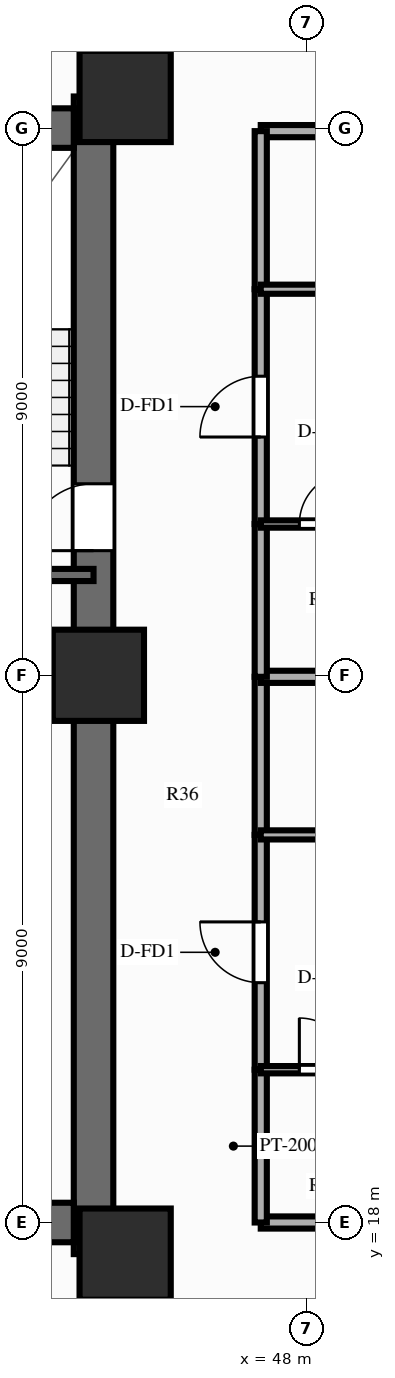
"""IFC4 building model, lengths in metres.
Left out: names, types, materials, properties, quantities, classifications, styles, units other than length and angle.
Written with IfcOpenShell. Run it as: python <this file> out.ifc"""

import sys

from ifc_helpers import new_model, si_unit, direction, frame, frame_2d, origin, origin_2d, place, context, subcontext, project, spatial, rectangle, extrude, source, transform, mapped, element, fill, save


model = new_model("IFC4")
c1 = context("Model", 3, precision=1e-05, world=origin(), true_north=direction((0.0, 1.0)))
c2 = subcontext(c1, "Body", "Model", "MODEL_VIEW")
j1 = project(units=[si_unit("LENGTHUNIT", "METRE"), si_unit("PLANEANGLEUNIT", "RADIAN")], contexts=[c1])
p1 = place(None, origin())
s1 = spatial("IfcSite", under=j1, at=p1, CompositionType="ELEMENT")
p2 = place(p1, origin())
s2 = spatial("IfcBuilding", under=s1, at=p2, CompositionType="ELEMENT")
p3 = place(p2, frame((0.0, 0.0, 25.4)))
s3 = spatial("IfcBuildingStorey", under=s2, at=p3, CompositionType="ELEMENT", Elevation=25.4)
p4 = place(p3, frame((44.5, 17.48, 0.0), z_axis=(0.0, 0.0, 1.0), x_axis=(0.0, 1.0, 0.0)))
e1 = element("IfcWall", 1, at=p4, inside=s3, PredefinedType="SHEAR", context=c2, shape_type="SweptSolid", body=[
    extrude(rectangle(XDim=19.04, YDim=0.65, at=frame_2d((9.52, 0.0))), origin(), (0.0, 0.0, 1.0), 3.0),
])
p5 = place(p4, frame((12.67, 0.0, 0.0), z_axis=(0.0, 0.0, 1.0), x_axis=(-1.0, 0.0, 0.0)))
e2 = element("IfcOpeningElement", 2, at=p5, cuts=e1, PredefinedType="OPENING", context=c2, shape_type="SweptSolid", body=[
    extrude(rectangle(XDim=1.1, YDim=2.15, at=frame_2d((0.55, 1.075))), frame((0.0, 0.337, 0.0), z_axis=(0.0, -1.0, 0.0), x_axis=(1.0, 0.0, 0.0)), (0.0, 0.0, 1.0), 0.674),
])
p6 = place(p3, frame((31.825, 18.0, 0.0), z_axis=(0.0, 0.0, 1.0), x_axis=(1.0, 0.0, 0.0)))
e3 = element("IfcWall", 3, at=p6, inside=s3, PredefinedType="SHEAR", context=c2, shape_type="SweptSolid", body=[
    extrude(rectangle(XDim=12.35, YDim=0.65, at=frame_2d((6.175, 0.0))), origin(), (0.0, 0.0, 1.0), 3.0),
])
p7 = place(p3, frame((31.825, 36.0, 0.0), z_axis=(0.0, 0.0, 1.0), x_axis=(1.0, 0.0, 0.0)))
e4 = element("IfcWall", 4, at=p7, inside=s3, PredefinedType="SHEAR", context=c2, shape_type="SweptSolid", body=[
    extrude(rectangle(XDim=12.35, YDim=0.65, at=frame_2d((6.175, 0.0))), origin(), (0.0, 0.0, 1.0), 3.0),
])
p8 = place(p7, frame((5.125, 0.0, 0.0), z_axis=(0.0, 0.0, 1.0), x_axis=(-1.0, 0.0, 0.0)))
e5 = element("IfcOpeningElement", 5, at=p8, cuts=e4, PredefinedType="OPENING", context=c2, shape_type="SweptSolid", body=[
    extrude(rectangle(XDim=1.4, YDim=2.15, at=frame_2d((0.7, 1.075))), frame((0.0, 0.337, 0.0), z_axis=(0.0, -1.0, 0.0), x_axis=(1.0, 0.0, 0.0)), (0.0, 0.0, 1.0), 0.674),
])
m1 = source(origin(), c2, "Body", "SweptSolid", [
    extrude(rectangle(XDim=1.5, YDim=1.5, at=origin_2d()), origin(), (0.0, 0.0, 1.0), 3.0),
])
for number, where, z_axis, x_axis in (
    (6, (45.02, 17.48, 0.0), (0.0, 0.0, 1.0), (1.0, 0.0, 0.0)),
    (7, (45.02, 36.52, 0.0), (0.0, 0.0, 1.0), (1.0, 0.0, 0.0)),
    (8, (44.58, 27.0, 0.0), (0.0, 0.0, 1.0), (1.0, 0.0, 0.0)),
):
    element("IfcColumn", number, at=place(p3, frame(where, z_axis=z_axis, x_axis=x_axis)), inside=s3, PredefinedType="COLUMN", context=c2, shape_type="MappedRepresentation", body=[
        mapped(m1, transform((0.0, 0.0, 0.0), scale=1.0)),
    ])
p9 = place(p3, frame((40.57, 28.65, 0.0), z_axis=(0.0, 0.0, 1.0), x_axis=(1.0, 0.0, 0.0)))
e9 = element("IfcWall", 9, at=p9, inside=s3, PredefinedType="SOLIDWALL", context=c2, shape_type="SweptSolid", body=[
    extrude(rectangle(XDim=3.93, YDim=0.2, at=frame_2d((1.965, 0.0))), origin(), (0.0, 0.0, 1.0), 2.79),
])
for number, where, z_axis, x_axis in (
    (10, (47.25, 18.0, 0.0), (0.0, 0.0, 1.0), (1.0, 0.0, 0.0)),
    (11, (47.25, 35.95, 0.0), (0.0, 0.0, 1.0), (1.0, 0.0, 0.0)),
):
    element("IfcWall", number, at=place(p3, frame(where, z_axis=z_axis, x_axis=x_axis)), inside=s3, PredefinedType="PARTITIONING", context=c2, shape_type="SweptSolid", body=[
        extrude(rectangle(XDim=16.6, YDim=0.2, at=frame_2d((8.3, 0.0))), origin(), (0.0, 0.0, 1.0), 2.24),
    ])
p10 = place(p3, frame((47.25, 18.0, 0.0), z_axis=(0.0, 0.0, 1.0), x_axis=(0.0, 1.0, 0.0)))
e12 = element("IfcWall", 12, at=p10, inside=s3, PredefinedType="PARTITIONING", context=c2, shape_type="SweptSolid", body=[
    extrude(rectangle(XDim=2.513, YDim=0.2, at=frame_2d((1.256, 0.0))), origin(), (0.0, 0.0, 1.0), 2.79),
])
p11 = place(p3, frame((47.25, 20.513, 0.0), z_axis=(0.0, 0.0, 1.0), x_axis=(0.0, 1.0, 0.0)))
e13 = element("IfcWall", 13, at=p11, inside=s3, PredefinedType="PARTITIONING", context=c2, shape_type="SweptSolid", body=[
    extrude(rectangle(XDim=3.862, YDim=0.2, at=frame_2d((1.931, 0.0))), origin(), (0.0, 0.0, 1.0), 2.79),
])
p12 = place(p11, frame((1.431, 0.0, 0.0)))
e14 = element("IfcOpeningElement", 14, at=p12, cuts=e13, PredefinedType="OPENING", context=c2, shape_type="SweptSolid", body=[
    extrude(rectangle(XDim=1.0, YDim=2.15, at=frame_2d((0.5, 1.075))), frame((0.0, 0.112, 0.0), z_axis=(0.0, -1.0, 0.0), x_axis=(1.0, 0.0, 0.0)), (0.0, 0.0, 1.0), 0.224),
])
p13 = place(p3, frame((47.25, 24.375, 0.0), z_axis=(0.0, 0.0, 1.0), x_axis=(0.0, 1.0, 0.0)))
e15 = element("IfcWall", 15, at=p13, inside=s3, PredefinedType="PARTITIONING", context=c2, shape_type="SweptSolid", body=[
    extrude(rectangle(XDim=2.6, YDim=0.2, at=frame_2d((1.3, 0.0))), origin(), (0.0, 0.0, 1.0), 2.79),
])
p14 = place(p3, frame((47.25, 20.513, 0.0), z_axis=(0.0, 0.0, 1.0), x_axis=(1.0, 0.0, 0.0)))
e16 = element("IfcWall", 16, at=p14, inside=s3, PredefinedType="PARTITIONING", context=c2, shape_type="SweptSolid", body=[
    extrude(rectangle(XDim=2.12, YDim=0.12, at=frame_2d((1.06, 0.0))), origin(), (0.0, 0.0, 1.0), 2.79),
])
p15 = place(p14, frame((0.635, 0.0, 0.0)))
e17 = element("IfcOpeningElement", 17, at=p15, cuts=e16, PredefinedType="OPENING", context=c2, shape_type="SweptSolid", body=[
    extrude(rectangle(XDim=0.85, YDim=2.05, at=frame_2d((0.425, 1.025))), frame((0.0, 0.072, 0.0), z_axis=(0.0, -1.0, 0.0), x_axis=(1.0, 0.0, 0.0)), (0.0, 0.0, 1.0), 0.144),
])
p16 = place(p3, frame((47.25, 24.375, 0.0), z_axis=(0.0, 0.0, 1.0), x_axis=(1.0, 0.0, 0.0)))
e18 = element("IfcWall", 18, at=p16, inside=s3, PredefinedType="PARTITIONING", context=c2, shape_type="SweptSolid", body=[
    extrude(rectangle(XDim=3.07, YDim=0.15, at=frame_2d((1.535, 0.0))), origin(), (0.0, 0.0, 1.0), 2.79),
])
p17 = place(p16, frame((1.085, 0.0, 0.0)))
e19 = element("IfcOpeningElement", 19, at=p17, cuts=e18, PredefinedType="OPENING", context=c2, shape_type="SweptSolid", body=[
    extrude(rectangle(XDim=0.9, YDim=2.1, at=frame_2d((0.45, 1.05))), frame((0.0, 0.087, 0.0), z_axis=(0.0, -1.0, 0.0), x_axis=(1.0, 0.0, 0.0)), (0.0, 0.0, 1.0), 0.174),
])
p18 = place(p3, frame((47.25, 26.975, 0.0), z_axis=(0.0, 0.0, 1.0), x_axis=(1.0, 0.0, 0.0)))
e20 = element("IfcWall", 20, at=p18, inside=s3, PredefinedType="PARTITIONING", context=c2, shape_type="SweptSolid", body=[
    extrude(rectangle(XDim=16.6, YDim=0.2, at=frame_2d((8.3, 0.0))), origin(), (0.0, 0.0, 1.0), 2.79),
])
p19 = place(p3, frame((47.25, 26.975, 0.0), z_axis=(0.0, 0.0, 1.0), x_axis=(0.0, 1.0, 0.0)))
e21 = element("IfcWall", 21, at=p19, inside=s3, PredefinedType="PARTITIONING", context=c2, shape_type="SweptSolid", body=[
    extrude(rectangle(XDim=2.513, YDim=0.2, at=frame_2d((1.256, 0.0))), origin(), (0.0, 0.0, 1.0), 2.79),
])
p20 = place(p3, frame((47.25, 29.488, 0.0), z_axis=(0.0, 0.0, 1.0), x_axis=(0.0, 1.0, 0.0)))
e22 = element("IfcWall", 22, at=p20, inside=s3, PredefinedType="PARTITIONING", context=c2, shape_type="SweptSolid", body=[
    extrude(rectangle(XDim=3.862, YDim=0.2, at=frame_2d((1.931, 0.0))), origin(), (0.0, 0.0, 1.0), 2.79),
])
p21 = place(p20, frame((1.431, 0.0, 0.0)))
e23 = element("IfcOpeningElement", 23, at=p21, cuts=e22, PredefinedType="OPENING", context=c2, shape_type="SweptSolid", body=[
    extrude(rectangle(XDim=1.0, YDim=2.15, at=frame_2d((0.5, 1.075))), frame((0.0, 0.112, 0.0), z_axis=(0.0, -1.0, 0.0), x_axis=(1.0, 0.0, 0.0)), (0.0, 0.0, 1.0), 0.224),
])
p22 = place(p3, frame((47.25, 33.35, 0.0), z_axis=(0.0, 0.0, 1.0), x_axis=(0.0, 1.0, 0.0)))
e24 = element("IfcWall", 24, at=p22, inside=s3, PredefinedType="PARTITIONING", context=c2, shape_type="SweptSolid", body=[
    extrude(rectangle(XDim=2.6, YDim=0.2, at=frame_2d((1.3, 0.0))), origin(), (0.0, 0.0, 1.0), 2.79),
])
p23 = place(p3, frame((47.25, 29.488, 0.0), z_axis=(0.0, 0.0, 1.0), x_axis=(1.0, 0.0, 0.0)))
e25 = element("IfcWall", 25, at=p23, inside=s3, PredefinedType="PARTITIONING", context=c2, shape_type="SweptSolid", body=[
    extrude(rectangle(XDim=2.12, YDim=0.12, at=frame_2d((1.06, 0.0))), origin(), (0.0, 0.0, 1.0), 2.79),
])
p24 = place(p23, frame((0.635, 0.0, 0.0)))
e26 = element("IfcOpeningElement", 26, at=p24, cuts=e25, PredefinedType="OPENING", context=c2, shape_type="SweptSolid", body=[
    extrude(rectangle(XDim=0.85, YDim=2.05, at=frame_2d((0.425, 1.025))), frame((0.0, 0.072, 0.0), z_axis=(0.0, -1.0, 0.0), x_axis=(1.0, 0.0, 0.0)), (0.0, 0.0, 1.0), 0.144),
])
p25 = place(p3, frame((47.25, 33.35, 0.0), z_axis=(0.0, 0.0, 1.0), x_axis=(1.0, 0.0, 0.0)))
e27 = element("IfcWall", 27, at=p25, inside=s3, PredefinedType="PARTITIONING", context=c2, shape_type="SweptSolid", body=[
    extrude(rectangle(XDim=3.07, YDim=0.15, at=frame_2d((1.535, 0.0))), origin(), (0.0, 0.0, 1.0), 2.79),
])
p26 = place(p25, frame((1.085, 0.0, 0.0)))
e28 = element("IfcOpeningElement", 28, at=p26, cuts=e27, PredefinedType="OPENING", context=c2, shape_type="SweptSolid", body=[
    extrude(rectangle(XDim=0.9, YDim=2.1, at=frame_2d((0.45, 1.05))), frame((0.0, 0.087, 0.0), z_axis=(0.0, -1.0, 0.0), x_axis=(1.0, 0.0, 0.0)), (0.0, 0.0, 1.0), 0.174),
])
m2 = source(origin(), c2, "Body", "SweptSolid", [
    extrude(rectangle(XDim=1.1, YDim=2.15, at=frame_2d((0.55, 1.075))), frame((0.0, 0.025, 0.0), z_axis=(0.0, -1.0, 0.0), x_axis=(1.0, 0.0, 0.0)), (0.0, 0.0, 1.0), 0.05),
])
p27 = place(p5, origin())
e29 = element("IfcDoor", 29, at=p27, inside=s3, OperationType="SINGLE_SWING_RIGHT", PredefinedType="DOOR", context=c2, shape_type="MappedRepresentation", body=[
    mapped(m2, transform((0.0, 0.0, 0.0), scale=1.0)),
])
fill(e2, e29)
m3 = source(origin(), c2, "Body", "SweptSolid", [
    extrude(rectangle(XDim=1.0, YDim=2.15, at=frame_2d((0.5, 1.075))), frame((0.0, 0.025, 0.0), z_axis=(0.0, -1.0, 0.0), x_axis=(1.0, 0.0, 0.0)), (0.0, 0.0, 1.0), 0.05),
])
p28 = place(p12, origin())
e30 = element("IfcDoor", 30, at=p28, inside=s3, OperationType="SINGLE_SWING_RIGHT", PredefinedType="DOOR", context=c2, shape_type="MappedRepresentation", body=[
    mapped(m3, transform((0.0, 0.0, 0.0), scale=1.0)),
])
fill(e14, e30)
m4 = source(origin(), c2, "Body", "SweptSolid", [
    extrude(rectangle(XDim=0.85, YDim=2.05, at=frame_2d((0.425, 1.025))), frame((0.0, 0.025, 0.0), z_axis=(0.0, -1.0, 0.0), x_axis=(1.0, 0.0, 0.0)), (0.0, 0.0, 1.0), 0.05),
])
p29 = place(p15, origin())
e31 = element("IfcDoor", 31, at=p29, inside=s3, OperationType="SINGLE_SWING_LEFT", PredefinedType="DOOR", context=c2, shape_type="MappedRepresentation", body=[
    mapped(m4, transform((0.0, 0.0, 0.0), scale=1.0)),
])
fill(e17, e31)
p30 = place(p21, origin())
e32 = element("IfcDoor", 32, at=p30, inside=s3, OperationType="SINGLE_SWING_LEFT", PredefinedType="DOOR", context=c2, shape_type="MappedRepresentation", body=[
    mapped(m3, transform((0.0, 0.0, 0.0), scale=1.0)),
])
fill(e23, e32)
p31 = place(p24, origin())
e33 = element("IfcDoor", 33, at=p31, inside=s3, OperationType="SINGLE_SWING_RIGHT", PredefinedType="DOOR", context=c2, shape_type="MappedRepresentation", body=[
    mapped(m4, transform((0.0, 0.0, 0.0), scale=1.0)),
])
fill(e26, e33)
save(model, sys.argv[1])
